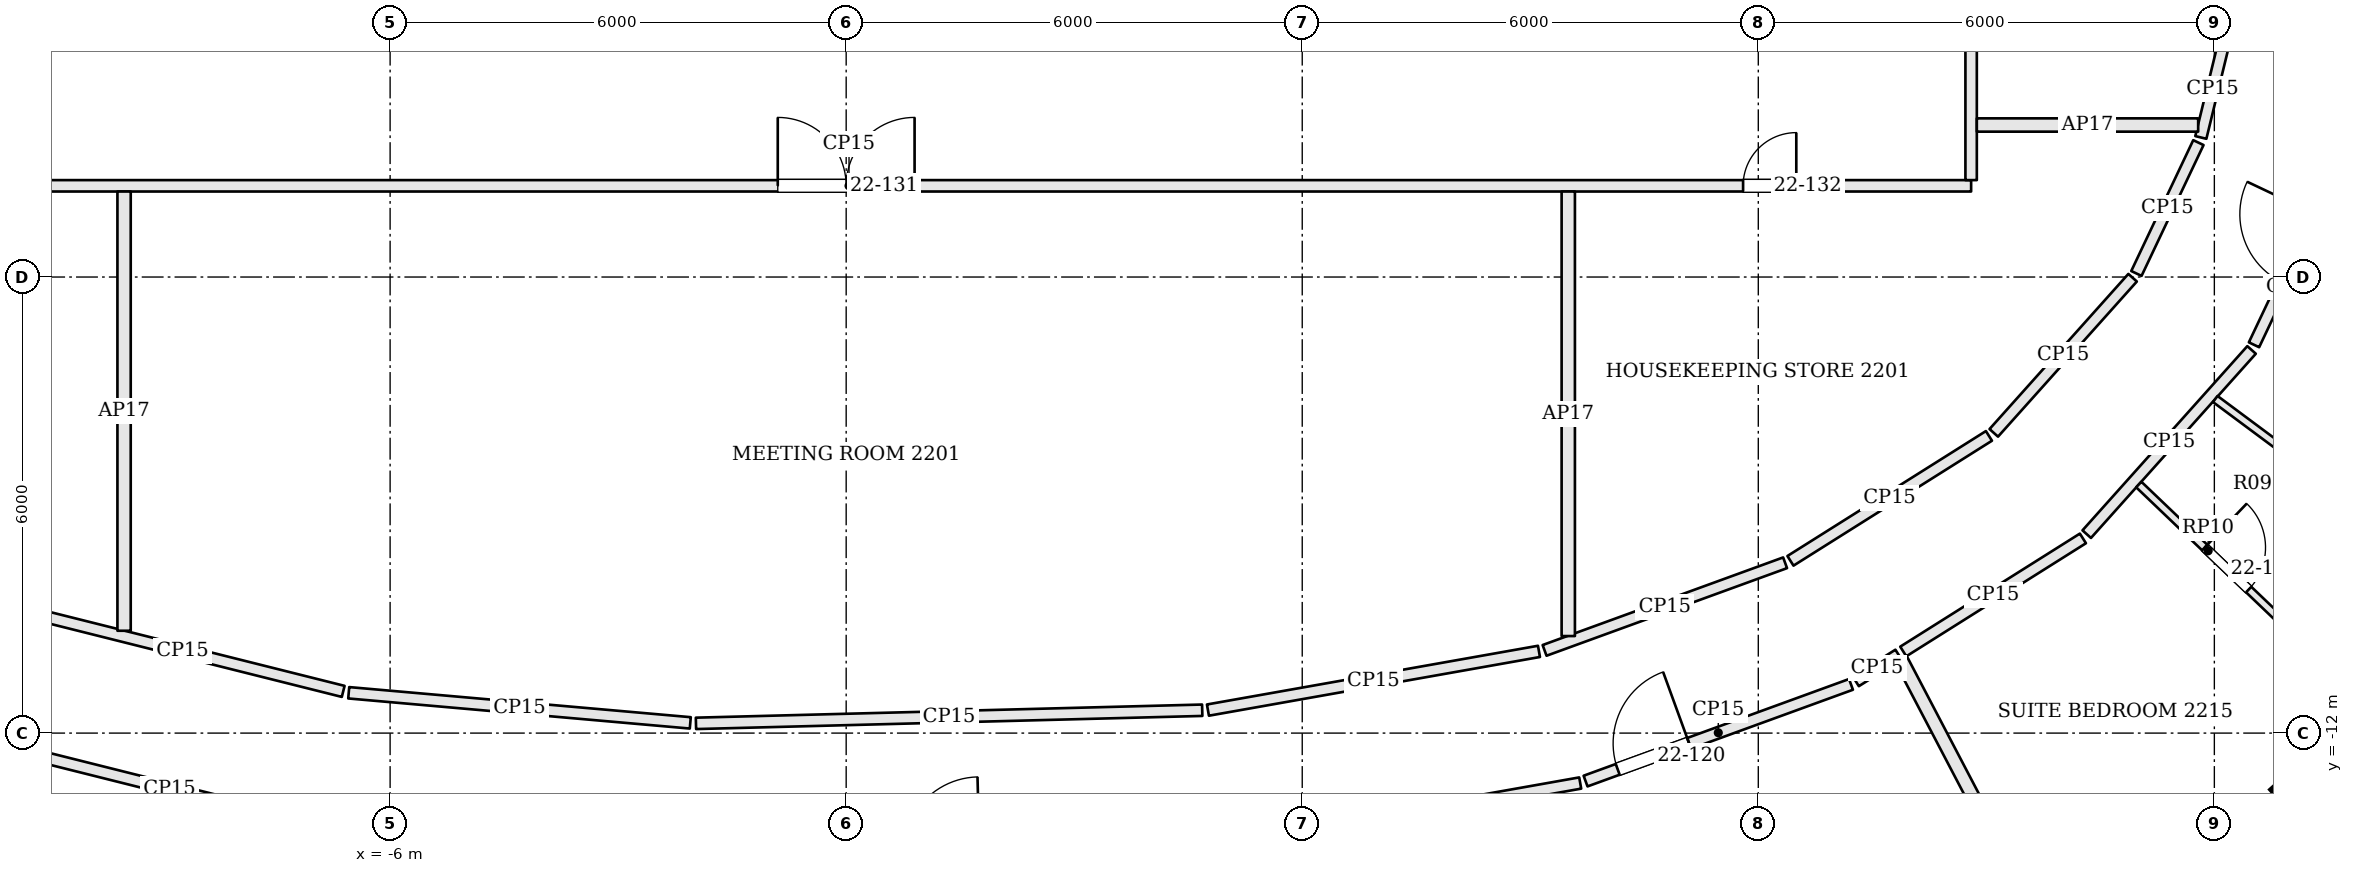
"""IFC4 building model, lengths in metres.
Left out: names, types, materials, properties, quantities, classifications, styles, units other than length and angle.
Written with IfcOpenShell. Run it as: python <this file> out.ifc"""

import sys

from ifc_helpers import new_model, si_unit, direction, frame, frame_2d, origin, origin_2d, place, context, subcontext, project, spatial, rectangle, extrude, element, fill, save


model = new_model("IFC4")
c1 = context("Model", 3, precision=1e-05, world=origin(), true_north=direction((0.0, 1.0)))
c2 = subcontext(c1, "Body", "Model", "MODEL_VIEW")
j1 = project(units=[si_unit("LENGTHUNIT", "METRE"), si_unit("PLANEANGLEUNIT", "RADIAN")], contexts=[c1])
p1 = place(None, origin())
s1 = spatial("IfcSite", under=j1, at=p1, CompositionType="ELEMENT")
p2 = place(p1, origin())
s2 = spatial("IfcBuilding", under=s1, at=p2, CompositionType="ELEMENT")
p3 = place(p2, frame((0.0, 0.0, 96.0)))
s3 = spatial("IfcBuildingStorey", under=s2, at=p3, CompositionType="ELEMENT", Elevation=96.0)
p4 = place(p3, frame((19.593, -12.79, 0.0), z_axis=(0.0, 0.0, 1.0), x_axis=(0.744021317198, 0.668155879683, 0.0)))
e1 = element("IfcColumn", 1, at=p4, inside=s3, PredefinedType="COLUMN", context=c2, shape_type="SweptSolid", body=[
    extrude(rectangle(XDim=1.2, YDim=1.2, at=origin_2d()), origin(), (0.0, 0.0, 1.0), 3.6),
])
p5 = place(p3, frame((-10.961, -12.218, 0.0), z_axis=(0.0, 0.0, 1.0), x_axis=(0.969990045386, -0.243144631551, 0.0)))
e2 = element("IfcWall", 2, at=p5, inside=s3, PredefinedType="PARTITIONING", context=c2, shape_type="SweptSolid", body=[
    extrude(rectangle(XDim=4.244, YDim=0.15, at=frame_2d((2.122, 0.0))), origin(), (0.0, 0.0, 1.0), 2.784),
])
p6 = place(p3, frame((5.015, -13.48, 0.0), z_axis=(0.0, 0.0, 1.0), x_axis=(0.984637772103, 0.174609443467, 0.0)))
e3 = element("IfcWall", 3, at=p6, inside=s3, PredefinedType="PARTITIONING", context=c2, shape_type="SweptSolid", body=[
    extrude(rectangle(XDim=4.715, YDim=0.15, at=frame_2d((2.357, 0.0))), origin(), (0.0, 0.0, 1.0), 2.784),
])
p7 = place(p3, frame((9.728, -12.631, 0.0), z_axis=(0.0, 0.0, 1.0), x_axis=(0.939626438181, 0.342201923826, 0.0)))
e4 = element("IfcWall", 4, at=p7, inside=s3, PredefinedType="PARTITIONING", context=c2, shape_type="SweptSolid", body=[
    extrude(rectangle(XDim=3.716, YDim=0.15, at=frame_2d((1.858, 0.0))), origin(), (0.0, 0.0, 1.0), 2.784),
])
p8 = place(p7, frame((0.45, 0.0, 0.0)))
e5 = element("IfcOpeningElement", 5, at=p8, cuts=e4, PredefinedType="OPENING", context=c2, shape_type="SweptSolid", body=[
    extrude(rectangle(XDim=1.0, YDim=2.1, at=frame_2d((0.5, 1.05))), frame((0.0, 0.085, 0.0), z_axis=(0.0, -1.0, 0.0), x_axis=(1.0, 0.0, 0.0)), (0.0, 0.0, 1.0), 0.17),
])
p9 = place(p3, frame((13.283, -11.319, 0.0), z_axis=(0.0, 0.0, 1.0), x_axis=(0.846275904875, 0.532744866543, 0.0)))
e6 = element("IfcWall", 6, at=p9, inside=s3, PredefinedType="PARTITIONING", context=c2, shape_type="SweptSolid", body=[
    extrude(rectangle(XDim=0.663, YDim=0.15, at=frame_2d((0.331, 0.0))), origin(), (0.0, 0.0, 1.0), 2.784),
])
p10 = place(p3, frame((17.193, -17.36, 0.0), z_axis=(0.0, 0.0, 1.0), x_axis=(-0.464005717448, 0.8858322043, 0.0)))
e7 = element("IfcWall", 7, at=p10, inside=s3, PredefinedType="PARTITIONING", context=c2, shape_type="SweptSolid", body=[
    extrude(rectangle(XDim=7.143, YDim=0.175, at=frame_2d((3.571, 0.0))), origin(), (0.0, 0.0, 1.0), 2.784),
])
p11 = place(p3, frame((13.907, -10.927, 0.0), z_axis=(0.0, 0.0, 1.0), x_axis=(0.846289768331, 0.53272284353, 0.0)))
e8 = element("IfcWall", 8, at=p11, inside=s3, PredefinedType="PARTITIONING", context=c2, shape_type="SweptSolid", body=[
    extrude(rectangle(XDim=2.793, YDim=0.15, at=frame_2d((1.396, 0.0))), origin(), (0.0, 0.0, 1.0), 2.784),
])
p12 = place(p3, frame((16.321, -9.383, 0.0), z_axis=(0.0, 0.0, 1.0), x_axis=(0.666834356165, 0.745205972492, 0.0)))
e9 = element("IfcWall", 9, at=p12, inside=s3, PredefinedType="PARTITIONING", context=c2, shape_type="SweptSolid", body=[
    extrude(rectangle(XDim=3.252, YDim=0.15, at=frame_2d((1.626, 0.0))), origin(), (0.0, 0.0, 1.0), 2.784),
])
p13 = place(p3, frame((18.522, -6.891, 0.0), z_axis=(0.0, 0.0, 1.0), x_axis=(0.428157819028, 0.903703979191, 0.0)))
e10 = element("IfcWall", 10, at=p13, inside=s3, PredefinedType="PARTITIONING", context=c2, shape_type="SweptSolid", body=[
    extrude(rectangle(XDim=2.349, YDim=0.15, at=frame_2d((1.175, 0.0))), origin(), (0.0, 0.0, 1.0), 2.784),
])
p14 = place(p13, frame((0.9, 0.0, 0.0)))
e11 = element("IfcOpeningElement", 11, at=p14, cuts=e10, PredefinedType="OPENING", context=c2, shape_type="SweptSolid", body=[
    extrude(rectangle(XDim=1.0, YDim=2.1, at=frame_2d((0.5, 1.05))), frame((0.0, 0.085, 0.0), z_axis=(0.0, -1.0, 0.0), x_axis=(1.0, 0.0, 0.0)), (0.0, 0.0, 1.0), 0.17),
])
p15 = place(p3, frame((18.135, -2.882, 0.0), z_axis=(0.0, 0.0, 1.0), x_axis=(-0.236653741324, -0.971594054489, 0.0)))
e12 = element("IfcWall", 12, at=p15, inside=s3, PredefinedType="PARTITIONING", context=c2, shape_type="SweptSolid", body=[
    extrude(rectangle(XDim=1.32, YDim=0.15, at=frame_2d((0.66, 0.0))), origin(), (0.0, 0.0, 1.0), 2.784),
])
p16 = place(p3, frame((17.79, -4.231, 0.0), z_axis=(0.0, 0.0, 1.0), x_axis=(-0.428042272357, -0.90375871397, 0.0)))
e13 = element("IfcWall", 13, at=p16, inside=s3, PredefinedType="PARTITIONING", context=c2, shape_type="SweptSolid", body=[
    extrude(rectangle(XDim=1.905, YDim=0.15, at=frame_2d((0.953, 0.0))), origin(), (0.0, 0.0, 1.0), 2.784),
])
p17 = place(p3, frame((16.925, -6.009, 0.0), z_axis=(0.0, 0.0, 1.0), x_axis=(-0.666893859891, -0.745152722359, 0.0)))
e14 = element("IfcWall", 14, at=p17, inside=s3, PredefinedType="PARTITIONING", context=c2, shape_type="SweptSolid", body=[
    extrude(rectangle(XDim=2.739, YDim=0.15, at=frame_2d((1.37, 0.0))), origin(), (0.0, 0.0, 1.0), 2.784),
])
p18 = place(p3, frame((15.034, -8.09, 0.0), z_axis=(0.0, 0.0, 1.0), x_axis=(-0.846322679414, -0.532670557014, 0.0)))
e15 = element("IfcWall", 15, at=p18, inside=s3, PredefinedType="PARTITIONING", context=c2, shape_type="SweptSolid", body=[
    extrude(rectangle(XDim=3.085, YDim=0.15, at=frame_2d((1.543, 0.0))), origin(), (0.0, 0.0, 1.0), 2.784),
])
p19 = place(p3, frame((12.353, -9.76, 0.0), z_axis=(0.0, 0.0, 1.0), x_axis=(-0.939632450309, -0.342185415127, 0.0)))
e16 = element("IfcWall", 16, at=p19, inside=s3, PredefinedType="PARTITIONING", context=c2, shape_type="SweptSolid", body=[
    extrude(rectangle(XDim=3.368, YDim=0.15, at=frame_2d((1.684, 0.0))), origin(), (0.0, 0.0, 1.0), 2.784),
])
p20 = place(p3, frame((9.115, -10.925, 0.0), z_axis=(0.0, 0.0, 1.0), x_axis=(-0.984632605417, -0.174638576352, 0.0)))
e17 = element("IfcWall", 17, at=p20, inside=s3, PredefinedType="PARTITIONING", context=c2, shape_type="SweptSolid", body=[
    extrude(rectangle(XDim=4.423, YDim=0.15, at=frame_2d((2.211, 0.0))), origin(), (0.0, 0.0, 1.0), 2.784),
])
p21 = place(p3, frame((4.684, -11.699, 0.0), z_axis=(0.0, 0.0, 1.0), x_axis=(-0.999663438204, -0.025942442425, 0.0)))
e18 = element("IfcWall", 18, at=p21, inside=s3, PredefinedType="PARTITIONING", context=c2, shape_type="SweptSolid", body=[
    extrude(rectangle(XDim=6.663, YDim=0.15, at=frame_2d((3.332, 0.0))), origin(), (0.0, 0.0, 1.0), 2.784),
])
p22 = place(p3, frame((-2.051, -11.865, 0.0), z_axis=(0.0, 0.0, 1.0), x_axis=(-0.996139599493, 0.087783246245, 0.0)))
e19 = element("IfcWall", 19, at=p22, inside=s3, PredefinedType="PARTITIONING", context=c2, shape_type="SweptSolid", body=[
    extrude(rectangle(XDim=4.511, YDim=0.15, at=frame_2d((2.255, 0.0))), origin(), (0.0, 0.0, 1.0), 2.784),
])
p23 = place(p3, frame((-6.617, -11.451, 0.0), z_axis=(0.0, 0.0, 1.0), x_axis=(-0.969987441267, 0.243155020069, 0.0)))
e20 = element("IfcWall", 20, at=p23, inside=s3, PredefinedType="PARTITIONING", context=c2, shape_type="SweptSolid", body=[
    extrude(rectangle(XDim=4.359, YDim=0.15, at=frame_2d((2.179, 0.0))), origin(), (0.0, 0.0, 1.0), 2.784),
])
p24 = place(p3, frame((-14.725, -4.8, 0.0), z_axis=(0.0, 0.0, 1.0), x_axis=(1.0, 0.0, 0.0)))
e21 = element("IfcWall", 21, at=p24, inside=s3, PredefinedType="PARTITIONING", context=c2, shape_type="SweptSolid", body=[
    extrude(rectangle(XDim=29.525, YDim=0.15, at=frame_2d((14.763, 0.0))), origin(), (0.0, 0.0, 1.0), 2.784),
])
p25 = place(p24, frame((2.075, 0.0, 0.0)))
e22 = element("IfcOpeningElement", 22, at=p25, cuts=e21, PredefinedType="OPENING", context=c2, shape_type="SweptSolid", body=[
    extrude(rectangle(XDim=1.0, YDim=2.1, at=frame_2d((0.5, 1.05))), frame((0.0, 0.085, 0.0), z_axis=(0.0, -1.0, 0.0), x_axis=(1.0, 0.0, 0.0)), (0.0, 0.0, 1.0), 0.17),
])
p26 = place(p24, frame((13.825, 0.0, 0.0)))
e23 = element("IfcOpeningElement", 23, at=p26, cuts=e21, PredefinedType="OPENING", context=c2, shape_type="SweptSolid", body=[
    extrude(rectangle(XDim=1.8, YDim=2.1, at=frame_2d((0.9, 1.05))), frame((0.0, 0.085, 0.0), z_axis=(0.0, -1.0, 0.0), x_axis=(1.0, 0.0, 0.0)), (0.0, 0.0, 1.0), 0.17),
])
p27 = place(p24, frame((26.525, 0.0, 0.0)))
e24 = element("IfcOpeningElement", 24, at=p27, cuts=e21, PredefinedType="OPENING", context=c2, shape_type="SweptSolid", body=[
    extrude(rectangle(XDim=0.7, YDim=2.1, at=frame_2d((0.35, 1.05))), frame((0.0, 0.085, 0.0), z_axis=(0.0, -1.0, 0.0), x_axis=(1.0, 0.0, 0.0)), (0.0, 0.0, 1.0), 0.17),
])
p28 = place(p3, frame((14.8, -4.725, 0.0), z_axis=(0.0, 0.0, 1.0), x_axis=(0.0, 1.0, 0.0)))
e25 = element("IfcWall", 25, at=p28, inside=s3, PredefinedType="PARTITIONING", context=c2, shape_type="SweptSolid", body=[
    extrude(rectangle(XDim=12.948, YDim=0.15, at=frame_2d((6.474, 0.0))), origin(), (0.0, 0.0, 1.0), 2.784),
])
p29 = place(p28, frame((6.336, 0.0, 0.0)))
e26 = element("IfcOpeningElement", 26, at=p29, cuts=e25, PredefinedType="OPENING", context=c2, shape_type="SweptSolid", body=[
    extrude(rectangle(XDim=1.0, YDim=2.1, at=frame_2d((0.5, 1.05))), frame((0.0, 0.085, 0.0), z_axis=(0.0, -1.0, 0.0), x_axis=(1.0, 0.0, 0.0)), (0.0, 0.0, 1.0), 0.17),
])
p30 = place(p3, frame((23.256, -11.501, 0.0), z_axis=(0.0, 0.0, 1.0), x_axis=(-0.802700401869, 0.596382482003, 0.0)))
e27 = element("IfcWall", 27, at=p30, inside=s3, PredefinedType="PARTITIONING", context=c2, shape_type="SweptSolid", body=[
    extrude(rectangle(XDim=6.533, YDim=0.1, at=frame_2d((3.267, 0.0))), origin(), (0.0, 0.0, 1.0), 2.884),
])
p31 = place(p30, frame((2.458, 0.0, 0.0)))
e28 = element("IfcOpeningElement", 28, at=p31, cuts=e27, PredefinedType="OPENING", context=c2, shape_type="SweptSolid", body=[
    extrude(rectangle(XDim=0.9, YDim=2.4, at=frame_2d((0.45, 1.2))), frame((0.0, 0.06, 0.0), z_axis=(0.0, -1.0, 0.0), x_axis=(1.0, 0.0, 0.0)), (0.0, 0.0, 1.0), 0.12),
])
p32 = place(p3, frame((17.006, -8.73, 0.0), z_axis=(0.0, 0.0, 1.0), x_axis=(0.722927369978, -0.690924031813, 0.0)))
e29 = element("IfcWall", 29, at=p32, inside=s3, PredefinedType="PARTITIONING", context=c2, shape_type="SweptSolid", body=[
    extrude(rectangle(XDim=2.525, YDim=0.1, at=frame_2d((1.263, 0.0))), origin(), (0.0, 0.0, 1.0), 2.884),
])
p33 = place(p32, frame((1.2, 0.0, 0.0)))
e30 = element("IfcOpeningElement", 30, at=p33, cuts=e29, PredefinedType="OPENING", context=c2, shape_type="SweptSolid", body=[
    extrude(rectangle(XDim=0.8, YDim=2.1, at=frame_2d((0.4, 1.05))), frame((0.0, 0.06, 0.0), z_axis=(0.0, -1.0, 0.0), x_axis=(1.0, 0.0, 0.0)), (0.0, 0.0, 1.0), 0.12),
])
p34 = place(p3, frame((-9.5, -10.654, 0.0), z_axis=(0.0, 0.0, 1.0), x_axis=(0.0, 1.0, 0.0)))
e31 = element("IfcWall", 31, at=p34, inside=s3, PredefinedType="PARTITIONING", context=c2, shape_type="SweptSolid", body=[
    extrude(rectangle(XDim=5.779, YDim=0.175, at=frame_2d((2.889, 0.0))), origin(), (0.0, 0.0, 1.0), 2.784),
])
p35 = place(p3, frame((9.5, -10.723, 0.0), z_axis=(0.0, 0.0, 1.0), x_axis=(0.0, 1.0, 0.0)))
e32 = element("IfcWall", 32, at=p35, inside=s3, PredefinedType="PARTITIONING", context=c2, shape_type="SweptSolid", body=[
    extrude(rectangle(XDim=5.848, YDim=0.175, at=frame_2d((2.924, 0.0))), origin(), (0.0, 0.0, 1.0), 2.784),
])
p36 = place(p3, frame((14.875, -4.0, 0.0), z_axis=(0.0, 0.0, 1.0), x_axis=(1.0, 0.0, 0.0)))
e33 = element("IfcWall", 33, at=p36, inside=s3, PredefinedType="PARTITIONING", context=c2, shape_type="SweptSolid", body=[
    extrude(rectangle(XDim=2.912, YDim=0.175, at=frame_2d((1.456, 0.0))), origin(), (0.0, 0.0, 1.0), 2.784),
])
p37 = place(p8, origin())
e34 = element("IfcDoor", 34, at=p37, inside=s3, OperationType="SINGLE_SWING_RIGHT", PredefinedType="DOOR", context=c2, shape_type="SweptSolid", body=[
    extrude(rectangle(XDim=1.0, YDim=2.1, at=frame_2d((0.5, 1.05))), frame((0.0, 0.025, 0.0), z_axis=(0.0, -1.0, 0.0), x_axis=(1.0, 0.0, 0.0)), (0.0, 0.0, 1.0), 0.05),
])
fill(e5, e34)
p38 = place(p33, origin())
e35 = element("IfcDoor", 35, at=p38, inside=s3, OperationType="SINGLE_SWING_LEFT", PredefinedType="DOOR", context=c2, shape_type="SweptSolid", body=[
    extrude(rectangle(XDim=0.8, YDim=2.1, at=frame_2d((0.4, 1.05))), frame((0.0, 0.025, 0.0), z_axis=(0.0, -1.0, 0.0), x_axis=(1.0, 0.0, 0.0)), (0.0, 0.0, 1.0), 0.05),
])
fill(e30, e35)
p39 = place(p26, origin())
e36 = element("IfcDoor", 36, at=p39, inside=s3, OperationType="DOUBLE_DOOR_SINGLE_SWING", PredefinedType="DOOR", context=c2, shape_type="SweptSolid", body=[
    extrude(rectangle(XDim=1.8, YDim=2.1, at=frame_2d((0.9, 1.05))), frame((0.0, 0.025, 0.0), z_axis=(0.0, -1.0, 0.0), x_axis=(1.0, 0.0, 0.0)), (0.0, 0.0, 1.0), 0.05),
])
fill(e23, e36)
p40 = place(p27, origin())
e37 = element("IfcDoor", 37, at=p40, inside=s3, OperationType="SINGLE_SWING_RIGHT", PredefinedType="DOOR", context=c2, shape_type="SweptSolid", body=[
    extrude(rectangle(XDim=0.7, YDim=2.1, at=frame_2d((0.35, 1.05))), frame((0.0, 0.025, 0.0), z_axis=(0.0, -1.0, 0.0), x_axis=(1.0, 0.0, 0.0)), (0.0, 0.0, 1.0), 0.05),
])
fill(e24, e37)
save(model, sys.argv[1])
